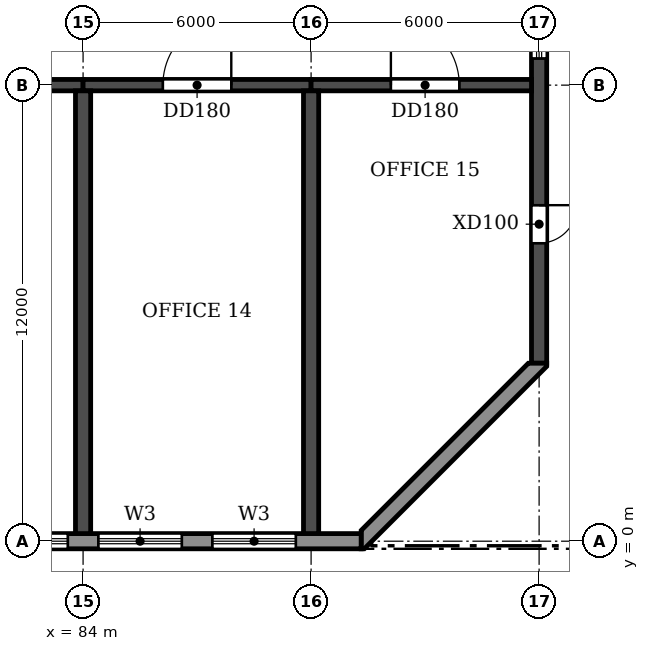
"""IFC4 building model, lengths in metres.
Left out: names, types, materials, properties, quantities, classifications, styles, units other than length and angle.
Written with IfcOpenShell. Run it as: python <this file> out.ifc"""

import sys

from ifc_helpers import new_model, si_unit, direction, frame, frame_2d, origin, place, context, subcontext, project, spatial, polyline, rectangle, outline, extrude, element, fill, save


model = new_model("IFC4")
c1 = context("Model", 3, precision=1e-05, world=origin(), true_north=direction((0.0, 1.0)))
c2 = subcontext(c1, "Body", "Model", "MODEL_VIEW")
j1 = project(units=[si_unit("LENGTHUNIT", "METRE"), si_unit("PLANEANGLEUNIT", "RADIAN")], contexts=[c1])
p1 = place(None, origin())
s1 = spatial("IfcSite", under=j1, at=p1, CompositionType="ELEMENT")
p2 = place(p1, origin())
s2 = spatial("IfcBuilding", under=s1, at=p2, CompositionType="ELEMENT")
p3 = place(p2, frame((0.0, 0.0, 53.1)))
s3 = spatial("IfcBuildingStorey", under=s2, at=p3, CompositionType="ELEMENT", Elevation=53.1)
for number, where, z_axis, x_axis in (
    (1, (84.0, 0.2, 0.0), (0.0, 0.0, 1.0), (0.0, 1.0, 0.0)),
    (2, (90.0, 0.2, 0.0), (0.0, 0.0, 1.0), (0.0, 1.0, 0.0)),
):
    element("IfcWall", number, at=place(p3, frame(where, z_axis=z_axis, x_axis=x_axis)), inside=s3, PredefinedType="SHEAR", context=c2, shape_type="SweptSolid", body=[
        extrude(rectangle(XDim=11.65, YDim=0.4, at=frame_2d((5.825, 0.0))), origin(), (0.0, 0.0, 1.0), 3.05),
    ])
p4 = place(p3, frame((96.0, 4.683, 0.0), z_axis=(0.0, 0.0, 1.0), x_axis=(0.0, 1.0, 0.0)))
e3 = element("IfcWall", 3, at=p4, inside=s3, PredefinedType="SHEAR", context=c2, shape_type="SweptSolid", body=[
    extrude(rectangle(XDim=35.434, YDim=0.4, at=frame_2d((17.717, 0.0))), origin(), (0.0, 0.0, 1.0), 3.05),
])
p5 = place(p4, frame((15.917, 0.0, 0.9)))
e4 = element("IfcOpeningElement", 4, at=p5, cuts=e3, PredefinedType="OPENING", context=c2, shape_type="SweptSolid", body=[
    extrude(rectangle(XDim=1.2, YDim=1.5, at=frame_2d((0.6, 0.75))), frame((0.0, 0.21, 0.0), z_axis=(0.0, -1.0, 0.0), x_axis=(1.0, 0.0, 0.0)), (0.0, 0.0, 1.0), 0.42),
])
p6 = place(p4, frame((23.817, 0.0, 0.9)))
e5 = element("IfcOpeningElement", 5, at=p6, cuts=e3, PredefinedType="OPENING", context=c2, shape_type="SweptSolid", body=[
    extrude(rectangle(XDim=1.2, YDim=1.5, at=frame_2d((0.6, 0.75))), frame((0.0, 0.21, 0.0), z_axis=(0.0, -1.0, 0.0), x_axis=(1.0, 0.0, 0.0)), (0.0, 0.0, 1.0), 0.42),
])
p7 = place(p4, frame((8.017, 0.0, 0.9)))
e6 = element("IfcOpeningElement", 6, at=p7, cuts=e3, PredefinedType="OPENING", context=c2, shape_type="SweptSolid", body=[
    extrude(rectangle(XDim=1.2, YDim=1.5, at=frame_2d((0.6, 0.75))), frame((0.0, 0.21, 0.0), z_axis=(0.0, -1.0, 0.0), x_axis=(1.0, 0.0, 0.0)), (0.0, 0.0, 1.0), 0.42),
])
p8 = place(p4, frame((30.076, 0.0, 0.0)))
e7 = element("IfcOpeningElement", 7, at=p8, cuts=e3, PredefinedType="OPENING", context=c2, shape_type="SweptSolid", body=[
    extrude(rectangle(XDim=1.0, YDim=2.1, at=frame_2d((0.5, 1.05))), frame((0.0, 0.21, 0.0), z_axis=(0.0, -1.0, 0.0), x_axis=(1.0, 0.0, 0.0)), (0.0, 0.0, 1.0), 0.42),
])
p9 = place(p4, frame((3.159, 0.0, 0.0)))
e8 = element("IfcOpeningElement", 8, at=p9, cuts=e3, PredefinedType="OPENING", context=c2, shape_type="SweptSolid", body=[
    extrude(rectangle(XDim=1.0, YDim=2.1, at=frame_2d((0.5, 1.05))), frame((0.0, 0.21, 0.0), z_axis=(0.0, -1.0, 0.0), x_axis=(1.0, 0.0, 0.0)), (0.0, 0.0, 1.0), 0.42),
])
p10 = place(p3, frame((78.0, 12.0, 0.0), z_axis=(0.0, 0.0, 1.0), x_axis=(1.0, 0.0, 0.0)))
e9 = element("IfcWall", 9, at=p10, inside=s3, PredefinedType="SHEAR", context=c2, shape_type="SweptSolid", body=[
    extrude(rectangle(XDim=6.0, YDim=0.3, at=frame_2d((3.0, 0.0))), origin(), (0.0, 0.0, 1.0), 2.45),
])
p11 = place(p10, frame((2.1, 0.0, 0.0)))
e10 = element("IfcOpeningElement", 10, at=p11, cuts=e9, PredefinedType="OPENING", context=c2, shape_type="SweptSolid", body=[
    extrude(rectangle(XDim=1.8, YDim=2.1, at=frame_2d((0.9, 1.05))), frame((0.0, 0.16, 0.0), z_axis=(0.0, -1.0, 0.0), x_axis=(1.0, 0.0, 0.0)), (0.0, 0.0, 1.0), 0.32),
])
p12 = place(p3, frame((84.0, 12.0, 0.0), z_axis=(0.0, 0.0, 1.0), x_axis=(1.0, 0.0, 0.0)))
e11 = element("IfcWall", 11, at=p12, inside=s3, PredefinedType="SHEAR", context=c2, shape_type="SweptSolid", body=[
    extrude(rectangle(XDim=6.0, YDim=0.3, at=frame_2d((3.0, 0.0))), origin(), (0.0, 0.0, 1.0), 2.45),
])
p13 = place(p12, frame((2.1, 0.0, 0.0)))
e12 = element("IfcOpeningElement", 12, at=p13, cuts=e11, PredefinedType="OPENING", context=c2, shape_type="SweptSolid", body=[
    extrude(rectangle(XDim=1.8, YDim=2.1, at=frame_2d((0.9, 1.05))), frame((0.0, 0.16, 0.0), z_axis=(0.0, -1.0, 0.0), x_axis=(1.0, 0.0, 0.0)), (0.0, 0.0, 1.0), 0.32),
])
p14 = place(p3, frame((90.0, 12.0, 0.0), z_axis=(0.0, 0.0, 1.0), x_axis=(1.0, 0.0, 0.0)))
e13 = element("IfcWall", 13, at=p14, inside=s3, PredefinedType="SHEAR", context=c2, shape_type="SweptSolid", body=[
    extrude(rectangle(XDim=5.8, YDim=0.3, at=frame_2d((2.9, 0.0))), origin(), (0.0, 0.0, 1.0), 2.45),
])
p15 = place(p14, frame((2.1, 0.0, 0.0)))
e14 = element("IfcOpeningElement", 14, at=p15, cuts=e13, PredefinedType="OPENING", context=c2, shape_type="SweptSolid", body=[
    extrude(rectangle(XDim=1.8, YDim=2.1, at=frame_2d((0.9, 1.05))), frame((0.0, 0.16, 0.0), z_axis=(0.0, -1.0, 0.0), x_axis=(1.0, 0.0, 0.0)), (0.0, 0.0, 1.0), 0.32),
])
p16 = place(p3, frame((10.683, 0.0, 0.0), z_axis=(0.0, 0.0, 1.0), x_axis=(1.0, 0.0, 0.0)))
e15 = element("IfcWall", 15, at=p16, inside=s3, PredefinedType="STANDARD", context=c2, shape_type="SweptSolid", body=[
    extrude(rectangle(XDim=80.634, YDim=0.4, at=frame_2d((40.317, 0.0))), origin(), (0.0, 0.0, 1.0), 3.05),
])
p17 = place(p16, frame((1.717, 0.0, 0.6)))
e16 = element("IfcOpeningElement", 16, at=p17, cuts=e15, PredefinedType="OPENING", context=c2, shape_type="SweptSolid", body=[
    extrude(rectangle(XDim=2.2, YDim=1.8, at=frame_2d((1.1, 0.9))), frame((0.0, 0.21, 0.0), z_axis=(0.0, -1.0, 0.0), x_axis=(1.0, 0.0, 0.0)), (0.0, 0.0, 1.0), 0.42),
])
p18 = place(p16, frame((4.717, 0.0, 0.6)))
e17 = element("IfcOpeningElement", 17, at=p18, cuts=e15, PredefinedType="OPENING", context=c2, shape_type="SweptSolid", body=[
    extrude(rectangle(XDim=2.2, YDim=1.8, at=frame_2d((1.1, 0.9))), frame((0.0, 0.21, 0.0), z_axis=(0.0, -1.0, 0.0), x_axis=(1.0, 0.0, 0.0)), (0.0, 0.0, 1.0), 0.42),
])
p19 = place(p16, frame((7.717, 0.0, 0.6)))
e18 = element("IfcOpeningElement", 18, at=p19, cuts=e15, PredefinedType="OPENING", context=c2, shape_type="SweptSolid", body=[
    extrude(rectangle(XDim=2.2, YDim=1.8, at=frame_2d((1.1, 0.9))), frame((0.0, 0.21, 0.0), z_axis=(0.0, -1.0, 0.0), x_axis=(1.0, 0.0, 0.0)), (0.0, 0.0, 1.0), 0.42),
])
p20 = place(p16, frame((10.717, 0.0, 0.6)))
e19 = element("IfcOpeningElement", 19, at=p20, cuts=e15, PredefinedType="OPENING", context=c2, shape_type="SweptSolid", body=[
    extrude(rectangle(XDim=2.2, YDim=1.8, at=frame_2d((1.1, 0.9))), frame((0.0, 0.21, 0.0), z_axis=(0.0, -1.0, 0.0), x_axis=(1.0, 0.0, 0.0)), (0.0, 0.0, 1.0), 0.42),
])
p21 = place(p16, frame((13.717, 0.0, 0.6)))
e20 = element("IfcOpeningElement", 20, at=p21, cuts=e15, PredefinedType="OPENING", context=c2, shape_type="SweptSolid", body=[
    extrude(rectangle(XDim=2.2, YDim=1.8, at=frame_2d((1.1, 0.9))), frame((0.0, 0.21, 0.0), z_axis=(0.0, -1.0, 0.0), x_axis=(1.0, 0.0, 0.0)), (0.0, 0.0, 1.0), 0.42),
])
p22 = place(p16, frame((16.717, 0.0, 0.6)))
e21 = element("IfcOpeningElement", 21, at=p22, cuts=e15, PredefinedType="OPENING", context=c2, shape_type="SweptSolid", body=[
    extrude(rectangle(XDim=2.2, YDim=1.8, at=frame_2d((1.1, 0.9))), frame((0.0, 0.21, 0.0), z_axis=(0.0, -1.0, 0.0), x_axis=(1.0, 0.0, 0.0)), (0.0, 0.0, 1.0), 0.42),
])
p23 = place(p16, frame((19.717, 0.0, 0.6)))
e22 = element("IfcOpeningElement", 22, at=p23, cuts=e15, PredefinedType="OPENING", context=c2, shape_type="SweptSolid", body=[
    extrude(rectangle(XDim=2.2, YDim=1.8, at=frame_2d((1.1, 0.9))), frame((0.0, 0.21, 0.0), z_axis=(0.0, -1.0, 0.0), x_axis=(1.0, 0.0, 0.0)), (0.0, 0.0, 1.0), 0.42),
])
p24 = place(p16, frame((22.717, 0.0, 0.6)))
e23 = element("IfcOpeningElement", 23, at=p24, cuts=e15, PredefinedType="OPENING", context=c2, shape_type="SweptSolid", body=[
    extrude(rectangle(XDim=2.2, YDim=1.8, at=frame_2d((1.1, 0.9))), frame((0.0, 0.21, 0.0), z_axis=(0.0, -1.0, 0.0), x_axis=(1.0, 0.0, 0.0)), (0.0, 0.0, 1.0), 0.42),
])
p25 = place(p16, frame((25.717, 0.0, 0.6)))
e24 = element("IfcOpeningElement", 24, at=p25, cuts=e15, PredefinedType="OPENING", context=c2, shape_type="SweptSolid", body=[
    extrude(rectangle(XDim=2.2, YDim=1.8, at=frame_2d((1.1, 0.9))), frame((0.0, 0.21, 0.0), z_axis=(0.0, -1.0, 0.0), x_axis=(1.0, 0.0, 0.0)), (0.0, 0.0, 1.0), 0.42),
])
p26 = place(p16, frame((28.717, 0.0, 0.6)))
e25 = element("IfcOpeningElement", 25, at=p26, cuts=e15, PredefinedType="OPENING", context=c2, shape_type="SweptSolid", body=[
    extrude(rectangle(XDim=2.2, YDim=1.8, at=frame_2d((1.1, 0.9))), frame((0.0, 0.21, 0.0), z_axis=(0.0, -1.0, 0.0), x_axis=(1.0, 0.0, 0.0)), (0.0, 0.0, 1.0), 0.42),
])
p27 = place(p16, frame((31.717, 0.0, 0.6)))
e26 = element("IfcOpeningElement", 26, at=p27, cuts=e15, PredefinedType="OPENING", context=c2, shape_type="SweptSolid", body=[
    extrude(rectangle(XDim=2.2, YDim=1.8, at=frame_2d((1.1, 0.9))), frame((0.0, 0.21, 0.0), z_axis=(0.0, -1.0, 0.0), x_axis=(1.0, 0.0, 0.0)), (0.0, 0.0, 1.0), 0.42),
])
p28 = place(p16, frame((34.717, 0.0, 0.6)))
e27 = element("IfcOpeningElement", 27, at=p28, cuts=e15, PredefinedType="OPENING", context=c2, shape_type="SweptSolid", body=[
    extrude(rectangle(XDim=2.2, YDim=1.8, at=frame_2d((1.1, 0.9))), frame((0.0, 0.21, 0.0), z_axis=(0.0, -1.0, 0.0), x_axis=(1.0, 0.0, 0.0)), (0.0, 0.0, 1.0), 0.42),
])
p29 = place(p16, frame((43.717, 0.0, 0.6)))
e28 = element("IfcOpeningElement", 28, at=p29, cuts=e15, PredefinedType="OPENING", context=c2, shape_type="SweptSolid", body=[
    extrude(rectangle(XDim=2.2, YDim=1.8, at=frame_2d((1.1, 0.9))), frame((0.0, 0.21, 0.0), z_axis=(0.0, -1.0, 0.0), x_axis=(1.0, 0.0, 0.0)), (0.0, 0.0, 1.0), 0.42),
])
p30 = place(p16, frame((46.717, 0.0, 0.6)))
e29 = element("IfcOpeningElement", 29, at=p30, cuts=e15, PredefinedType="OPENING", context=c2, shape_type="SweptSolid", body=[
    extrude(rectangle(XDim=2.2, YDim=1.8, at=frame_2d((1.1, 0.9))), frame((0.0, 0.21, 0.0), z_axis=(0.0, -1.0, 0.0), x_axis=(1.0, 0.0, 0.0)), (0.0, 0.0, 1.0), 0.42),
])
p31 = place(p16, frame((49.717, 0.0, 0.6)))
e30 = element("IfcOpeningElement", 30, at=p31, cuts=e15, PredefinedType="OPENING", context=c2, shape_type="SweptSolid", body=[
    extrude(rectangle(XDim=2.2, YDim=1.8, at=frame_2d((1.1, 0.9))), frame((0.0, 0.21, 0.0), z_axis=(0.0, -1.0, 0.0), x_axis=(1.0, 0.0, 0.0)), (0.0, 0.0, 1.0), 0.42),
])
p32 = place(p16, frame((52.717, 0.0, 0.6)))
e31 = element("IfcOpeningElement", 31, at=p32, cuts=e15, PredefinedType="OPENING", context=c2, shape_type="SweptSolid", body=[
    extrude(rectangle(XDim=2.2, YDim=1.8, at=frame_2d((1.1, 0.9))), frame((0.0, 0.21, 0.0), z_axis=(0.0, -1.0, 0.0), x_axis=(1.0, 0.0, 0.0)), (0.0, 0.0, 1.0), 0.42),
])
p33 = place(p16, frame((61.717, 0.0, 0.6)))
e32 = element("IfcOpeningElement", 32, at=p33, cuts=e15, PredefinedType="OPENING", context=c2, shape_type="SweptSolid", body=[
    extrude(rectangle(XDim=2.2, YDim=1.8, at=frame_2d((1.1, 0.9))), frame((0.0, 0.21, 0.0), z_axis=(0.0, -1.0, 0.0), x_axis=(1.0, 0.0, 0.0)), (0.0, 0.0, 1.0), 0.42),
])
p34 = place(p16, frame((64.717, 0.0, 0.6)))
e33 = element("IfcOpeningElement", 33, at=p34, cuts=e15, PredefinedType="OPENING", context=c2, shape_type="SweptSolid", body=[
    extrude(rectangle(XDim=2.2, YDim=1.8, at=frame_2d((1.1, 0.9))), frame((0.0, 0.21, 0.0), z_axis=(0.0, -1.0, 0.0), x_axis=(1.0, 0.0, 0.0)), (0.0, 0.0, 1.0), 0.42),
])
p35 = place(p16, frame((67.717, 0.0, 0.6)))
e34 = element("IfcOpeningElement", 34, at=p35, cuts=e15, PredefinedType="OPENING", context=c2, shape_type="SweptSolid", body=[
    extrude(rectangle(XDim=2.2, YDim=1.8, at=frame_2d((1.1, 0.9))), frame((0.0, 0.21, 0.0), z_axis=(0.0, -1.0, 0.0), x_axis=(1.0, 0.0, 0.0)), (0.0, 0.0, 1.0), 0.42),
])
p36 = place(p16, frame((70.717, 0.0, 0.6)))
e35 = element("IfcOpeningElement", 35, at=p36, cuts=e15, PredefinedType="OPENING", context=c2, shape_type="SweptSolid", body=[
    extrude(rectangle(XDim=2.2, YDim=1.8, at=frame_2d((1.1, 0.9))), frame((0.0, 0.21, 0.0), z_axis=(0.0, -1.0, 0.0), x_axis=(1.0, 0.0, 0.0)), (0.0, 0.0, 1.0), 0.42),
])
p37 = place(p16, frame((73.717, 0.0, 0.6)))
e36 = element("IfcOpeningElement", 36, at=p37, cuts=e15, PredefinedType="OPENING", context=c2, shape_type="SweptSolid", body=[
    extrude(rectangle(XDim=2.2, YDim=1.8, at=frame_2d((1.1, 0.9))), frame((0.0, 0.21, 0.0), z_axis=(0.0, -1.0, 0.0), x_axis=(1.0, 0.0, 0.0)), (0.0, 0.0, 1.0), 0.42),
])
p38 = place(p16, frame((76.717, 0.0, 0.6)))
e37 = element("IfcOpeningElement", 37, at=p38, cuts=e15, PredefinedType="OPENING", context=c2, shape_type="SweptSolid", body=[
    extrude(rectangle(XDim=2.2, YDim=1.8, at=frame_2d((1.1, 0.9))), frame((0.0, 0.21, 0.0), z_axis=(0.0, -1.0, 0.0), x_axis=(1.0, 0.0, 0.0)), (0.0, 0.0, 1.0), 0.42),
])
p39 = place(p3, origin())
e38 = element("IfcWall", 38, at=p39, inside=s3, PredefinedType="STANDARD", context=c2, shape_type="SweptSolid", body=[
    extrude(outline(polyline([(91.317, -0.2), (91.4, -0.2), (96.2, 4.6), (96.2, 4.683), (95.717, 4.683), (91.317, 0.283), (91.317, -0.2)])), origin(), (0.0, 0.0, 1.0), 3.05),
])
p40 = place(p36, origin())
e39 = element("IfcWindow", 39, at=p40, inside=s3, PartitioningType="DOUBLE_PANEL_HORIZONTAL", PredefinedType="WINDOW", context=c2, shape_type="SweptSolid", body=[
    extrude(rectangle(XDim=2.2, YDim=1.8, at=frame_2d((1.1, 0.9))), frame((0.0, 0.03, 0.0), z_axis=(0.0, -1.0, 0.0), x_axis=(1.0, 0.0, 0.0)), (0.0, 0.0, 1.0), 0.06),
])
fill(e35, e39)
p41 = place(p37, origin())
e40 = element("IfcWindow", 40, at=p41, inside=s3, PartitioningType="DOUBLE_PANEL_HORIZONTAL", PredefinedType="WINDOW", context=c2, shape_type="SweptSolid", body=[
    extrude(rectangle(XDim=2.2, YDim=1.8, at=frame_2d((1.1, 0.9))), frame((0.0, 0.03, 0.0), z_axis=(0.0, -1.0, 0.0), x_axis=(1.0, 0.0, 0.0)), (0.0, 0.0, 1.0), 0.06),
])
fill(e36, e40)
p42 = place(p38, origin())
e41 = element("IfcWindow", 41, at=p42, inside=s3, PartitioningType="DOUBLE_PANEL_HORIZONTAL", PredefinedType="WINDOW", context=c2, shape_type="SweptSolid", body=[
    extrude(rectangle(XDim=2.2, YDim=1.8, at=frame_2d((1.1, 0.9))), frame((0.0, 0.03, 0.0), z_axis=(0.0, -1.0, 0.0), x_axis=(1.0, 0.0, 0.0)), (0.0, 0.0, 1.0), 0.06),
])
fill(e37, e41)
p43 = place(p7, origin())
e42 = element("IfcWindow", 42, at=p43, inside=s3, PartitioningType="SINGLE_PANEL", PredefinedType="WINDOW", context=c2, shape_type="SweptSolid", body=[
    extrude(rectangle(XDim=1.2, YDim=1.5, at=frame_2d((0.6, 0.75))), frame((0.0, 0.03, 0.0), z_axis=(0.0, -1.0, 0.0), x_axis=(1.0, 0.0, 0.0)), (0.0, 0.0, 1.0), 0.06),
])
fill(e6, e42)
p44 = place(p13, origin())
e43 = element("IfcDoor", 43, at=p44, inside=s3, OperationType="DOUBLE_DOOR_SINGLE_SWING", PredefinedType="DOOR", context=c2, shape_type="SweptSolid", body=[
    extrude(rectangle(XDim=1.8, YDim=2.1, at=frame_2d((0.9, 1.05))), frame((0.0, 0.025, 0.0), z_axis=(0.0, -1.0, 0.0), x_axis=(1.0, 0.0, 0.0)), (0.0, 0.0, 1.0), 0.05),
])
fill(e12, e43)
p45 = place(p15, origin())
e44 = element("IfcDoor", 44, at=p45, inside=s3, OperationType="DOUBLE_DOOR_SINGLE_SWING", PredefinedType="DOOR", context=c2, shape_type="SweptSolid", body=[
    extrude(rectangle(XDim=1.8, YDim=2.1, at=frame_2d((0.9, 1.05))), frame((0.0, 0.025, 0.0), z_axis=(0.0, -1.0, 0.0), x_axis=(1.0, 0.0, 0.0)), (0.0, 0.0, 1.0), 0.05),
])
fill(e14, e44)
p46 = place(p9, frame((1.0, 0.0, 0.0), z_axis=(0.0, 0.0, 1.0), x_axis=(-1.0, 0.0, 0.0)))
e45 = element("IfcDoor", 45, at=p46, inside=s3, OperationType="SINGLE_SWING_LEFT", PredefinedType="DOOR", context=c2, shape_type="SweptSolid", body=[
    extrude(rectangle(XDim=1.0, YDim=2.1, at=frame_2d((0.5, 1.05))), frame((0.0, 0.025, 0.0), z_axis=(0.0, -1.0, 0.0), x_axis=(1.0, 0.0, 0.0)), (0.0, 0.0, 1.0), 0.05),
])
fill(e8, e45)
save(model, sys.argv[1])
